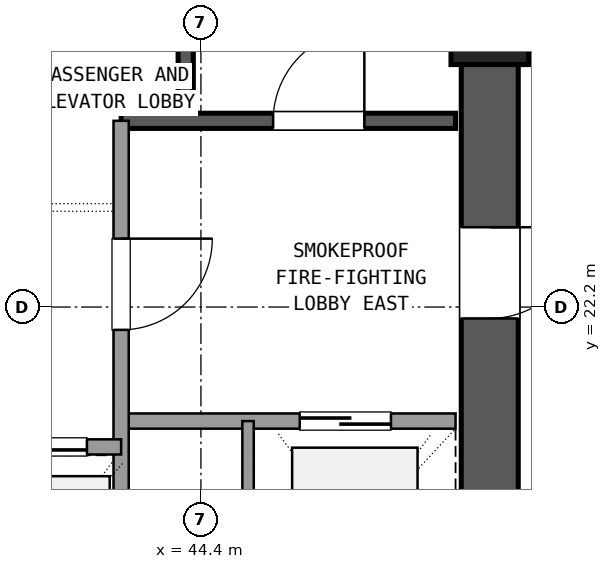
"""IFC4 building model, lengths in metres.
Left out: names, types, materials, properties, quantities, classifications, styles, units other than length and angle.
Written with IfcOpenShell. Run it as: python <this file> out.ifc"""

import sys

from ifc_helpers import new_model, si_unit, direction, frame, frame_2d, origin, origin_2d, place, context, subcontext, project, spatial, rectangle, extrude, element, fill, save


model = new_model("IFC4")
c1 = context("Model", 3, precision=1e-05, world=origin(), true_north=direction((0.0, 1.0)))
c2 = subcontext(c1, "Body", "Model", "MODEL_VIEW")
j1 = project(units=[si_unit("LENGTHUNIT", "METRE"), si_unit("PLANEANGLEUNIT", "RADIAN")], contexts=[c1])
p1 = place(None, origin())
s1 = spatial("IfcSite", under=j1, at=p1, CompositionType="ELEMENT")
p2 = place(p1, origin())
s2 = spatial("IfcBuilding", under=s1, at=p2, CompositionType="ELEMENT")
p3 = place(p2, frame((0.0, 0.0, 156.42)))
s3 = spatial("IfcBuildingStorey", under=s2, at=p3, CompositionType="ELEMENT", Elevation=156.42)
p4 = place(p3, frame((48.2, 25.9, 0.0), z_axis=(0.0, 0.0, 1.0), x_axis=(1.0, 0.0, 0.0)))
e1 = element("IfcColumn", 1, at=p4, inside=s3, PredefinedType="COLUMN", context=c2, shape_type="SweptSolid", body=[
    extrude(rectangle(XDim=1.02, YDim=1.02, at=origin_2d()), origin(), (0.0, 0.0, 1.0), 3.6),
])
p5 = place(p3, frame((48.2, 17.805, 0.0), z_axis=(0.0, 0.0, 1.0), x_axis=(0.0, 1.0, 0.0)))
e2 = element("IfcWall", 2, at=p5, inside=s3, PredefinedType="SHEAR", context=c2, shape_type="SweptSolid", body=[
    extrude(rectangle(XDim=7.59, YDim=0.75, at=frame_2d((3.795, 0.0))), origin(), (0.0, 0.0, 1.0), 3.32),
])
p6 = place(p5, frame((4.245, 0.0, 0.0)))
e3 = element("IfcOpeningElement", 3, at=p6, cuts=e2, PredefinedType="OPENING", context=c2, shape_type="SweptSolid", body=[
    extrude(rectangle(XDim=1.2, YDim=2.15, at=frame_2d((0.6, 1.075))), frame((0.0, 0.385, 0.0), z_axis=(0.0, -1.0, 0.0), x_axis=(1.0, 0.0, 0.0)), (0.0, 0.0, 1.0), 0.77),
])
p7 = place(p3, frame((44.2, 24.65, 0.0), z_axis=(0.0, 0.0, 1.0), x_axis=(0.0, 1.0, 0.0)))
e4 = element("IfcWall", 4, at=p7, inside=s3, PredefinedType="SHEAR", context=c2, shape_type="SweptSolid", body=[
    extrude(rectangle(XDim=9.4, YDim=0.2, at=frame_2d((4.7, 0.0))), origin(), (0.0, 0.0, 1.0), 3.32),
])
p8 = place(p3, frame((43.35, 24.65, 0.0), z_axis=(0.0, 0.0, 1.0), x_axis=(1.0, 0.0, 0.0)))
e5 = element("IfcWall", 5, at=p8, inside=s3, PredefinedType="SHEAR", context=c2, shape_type="SweptSolid", body=[
    extrude(rectangle(XDim=4.4, YDim=0.2, at=frame_2d((2.2, 0.0))), origin(), (0.0, 0.0, 1.0), 3.32),
])
p9 = place(p8, frame((2.0, 0.0, 0.0)))
e6 = element("IfcOpeningElement", 6, at=p9, cuts=e5, PredefinedType="OPENING", context=c2, shape_type="SweptSolid", body=[
    extrude(rectangle(XDim=1.2, YDim=2.15, at=frame_2d((0.6, 1.075))), frame((0.0, 0.11, 0.0), z_axis=(0.0, -1.0, 0.0), x_axis=(1.0, 0.0, 0.0)), (0.0, 0.0, 1.0), 0.22),
])
p10 = place(p3, frame((43.35, 20.7, 0.0), z_axis=(0.0, 0.0, 1.0), x_axis=(1.0, 0.0, 0.0)))
e7 = element("IfcWall", 7, at=p10, inside=s3, PredefinedType="SOLIDWALL", context=c2, shape_type="SweptSolid", body=[
    extrude(rectangle(XDim=4.4, YDim=0.2, at=frame_2d((2.2, 0.0))), origin(), (0.0, 0.0, 1.0), 2.61),
])
p11 = place(p10, frame((2.35, 0.0, 0.0)))
e8 = element("IfcOpeningElement", 8, at=p11, cuts=e7, PredefinedType="OPENING", context=c2, shape_type="SweptSolid", body=[
    extrude(rectangle(XDim=1.2, YDim=2.15, at=frame_2d((0.6, 1.075))), frame((0.0, 0.11, 0.0), z_axis=(0.0, -1.0, 0.0), x_axis=(1.0, 0.0, 0.0)), (0.0, 0.0, 1.0), 0.22),
])
p12 = place(p3, frame((43.35, 17.75, 0.0), z_axis=(0.0, 0.0, 1.0), x_axis=(0.0, 1.0, 0.0)))
e9 = element("IfcWall", 9, at=p12, inside=s3, PredefinedType="SOLIDWALL", context=c2, shape_type="SweptSolid", body=[
    extrude(rectangle(XDim=6.9, YDim=0.2, at=frame_2d((3.45, 0.0))), origin(), (0.0, 0.0, 1.0), 2.61),
])
p13 = place(p12, frame((4.15, 0.0, 0.0)))
e10 = element("IfcOpeningElement", 10, at=p13, cuts=e9, PredefinedType="OPENING", context=c2, shape_type="SweptSolid", body=[
    extrude(rectangle(XDim=1.2, YDim=2.15, at=frame_2d((0.6, 1.075))), frame((0.0, 0.11, 0.0), z_axis=(0.0, -1.0, 0.0), x_axis=(1.0, 0.0, 0.0)), (0.0, 0.0, 1.0), 0.22),
])
p14 = place(p3, frame((45.02, 17.75, 0.0), z_axis=(0.0, 0.0, 1.0), x_axis=(0.0, 1.0, 0.0)))
e11 = element("IfcWall", 11, at=p14, inside=s3, PredefinedType="PARTITIONING", context=c2, shape_type="SweptSolid", body=[
    extrude(rectangle(XDim=2.95, YDim=0.15, at=frame_2d((1.475, 0.0))), origin(), (0.0, 0.0, 1.0), 2.61),
])
p15 = place(p3, frame((37.25, 20.36, 0.0), z_axis=(0.0, 0.0, 1.0), x_axis=(1.0, 0.0, 0.0)))
e12 = element("IfcWall", 12, at=p15, inside=s3, PredefinedType="SOLIDWALL", context=c2, shape_type="SweptSolid", body=[
    extrude(rectangle(XDim=6.1, YDim=0.2, at=frame_2d((3.05, 0.0))), origin(), (0.0, 0.0, 1.0), 2.61),
])
p16 = place(p15, frame((0.45, 0.0, 0.0)))
e13 = element("IfcOpeningElement", 13, at=p16, cuts=e12, PredefinedType="OPENING", context=c2, shape_type="SweptSolid", body=[
    extrude(rectangle(XDim=1.1, YDim=2.15, at=frame_2d((0.55, 1.075))), frame((0.0, 0.11, 0.0), z_axis=(0.0, -1.0, 0.0), x_axis=(1.0, 0.0, 0.0)), (0.0, 0.0, 1.0), 0.22),
])
p17 = place(p15, frame((2.5, 0.0, 0.0)))
e14 = element("IfcOpeningElement", 14, at=p17, cuts=e12, PredefinedType="OPENING", context=c2, shape_type="SweptSolid", body=[
    extrude(rectangle(XDim=1.1, YDim=2.15, at=frame_2d((0.55, 1.075))), frame((0.0, 0.11, 0.0), z_axis=(0.0, -1.0, 0.0), x_axis=(1.0, 0.0, 0.0)), (0.0, 0.0, 1.0), 0.22),
])
p18 = place(p15, frame((4.55, 0.0, 0.0)))
e15 = element("IfcOpeningElement", 15, at=p18, cuts=e12, PredefinedType="OPENING", context=c2, shape_type="SweptSolid", body=[
    extrude(rectangle(XDim=1.1, YDim=2.15, at=frame_2d((0.55, 1.075))), frame((0.0, 0.11, 0.0), z_axis=(0.0, -1.0, 0.0), x_axis=(1.0, 0.0, 0.0)), (0.0, 0.0, 1.0), 0.22),
])
p19 = place(p9, origin())
e16 = element("IfcDoor", 16, at=p19, inside=s3, OperationType="SINGLE_SWING_RIGHT", PredefinedType="DOOR", context=c2, shape_type="SweptSolid", body=[
    extrude(rectangle(XDim=1.2, YDim=2.15, at=frame_2d((0.6, 1.075))), frame((0.0, 0.025, 0.0), z_axis=(0.0, -1.0, 0.0), x_axis=(1.0, 0.0, 0.0)), (0.0, 0.0, 1.0), 0.05),
])
fill(e6, e16)
p20 = place(p11, origin())
e17 = element("IfcDoor", 17, at=p20, inside=s3, OperationType="SLIDING_TO_RIGHT", PredefinedType="DOOR", context=c2, shape_type="SweptSolid", body=[
    extrude(rectangle(XDim=1.2, YDim=2.15, at=frame_2d((0.6, 1.075))), frame((0.0, 0.025, 0.0), z_axis=(0.0, -1.0, 0.0), x_axis=(1.0, 0.0, 0.0)), (0.0, 0.0, 1.0), 0.05),
])
fill(e8, e17)
p21 = place(p13, frame((1.2, 0.0, 0.0), z_axis=(0.0, 0.0, 1.0), x_axis=(-1.0, 0.0, 0.0)))
e18 = element("IfcDoor", 18, at=p21, inside=s3, OperationType="SINGLE_SWING_RIGHT", PredefinedType="DOOR", context=c2, shape_type="SweptSolid", body=[
    extrude(rectangle(XDim=1.2, YDim=2.15, at=frame_2d((0.6, 1.075))), frame((0.0, 0.025, 0.0), z_axis=(0.0, -1.0, 0.0), x_axis=(1.0, 0.0, 0.0)), (0.0, 0.0, 1.0), 0.05),
])
fill(e10, e18)
p22 = place(p6, frame((1.2, 0.0, 0.0), z_axis=(0.0, 0.0, 1.0), x_axis=(-1.0, 0.0, 0.0)))
e19 = element("IfcDoor", 19, at=p22, inside=s3, OperationType="SINGLE_SWING_RIGHT", PredefinedType="DOOR", context=c2, shape_type="SweptSolid", body=[
    extrude(rectangle(XDim=1.2, YDim=2.15, at=frame_2d((0.6, 1.075))), frame((0.0, 0.025, 0.0), z_axis=(0.0, -1.0, 0.0), x_axis=(1.0, 0.0, 0.0)), (0.0, 0.0, 1.0), 0.05),
])
fill(e3, e19)
p23 = place(p18, origin())
e20 = element("IfcDoor", 20, at=p23, inside=s3, OperationType="SLIDING_TO_LEFT", PredefinedType="DOOR", context=c2, shape_type="SweptSolid", body=[
    extrude(rectangle(XDim=1.1, YDim=2.15, at=frame_2d((0.55, 1.075))), frame((0.0, 0.025, 0.0), z_axis=(0.0, -1.0, 0.0), x_axis=(1.0, 0.0, 0.0)), (0.0, 0.0, 1.0), 0.05),
])
fill(e15, e20)
save(model, sys.argv[1])
